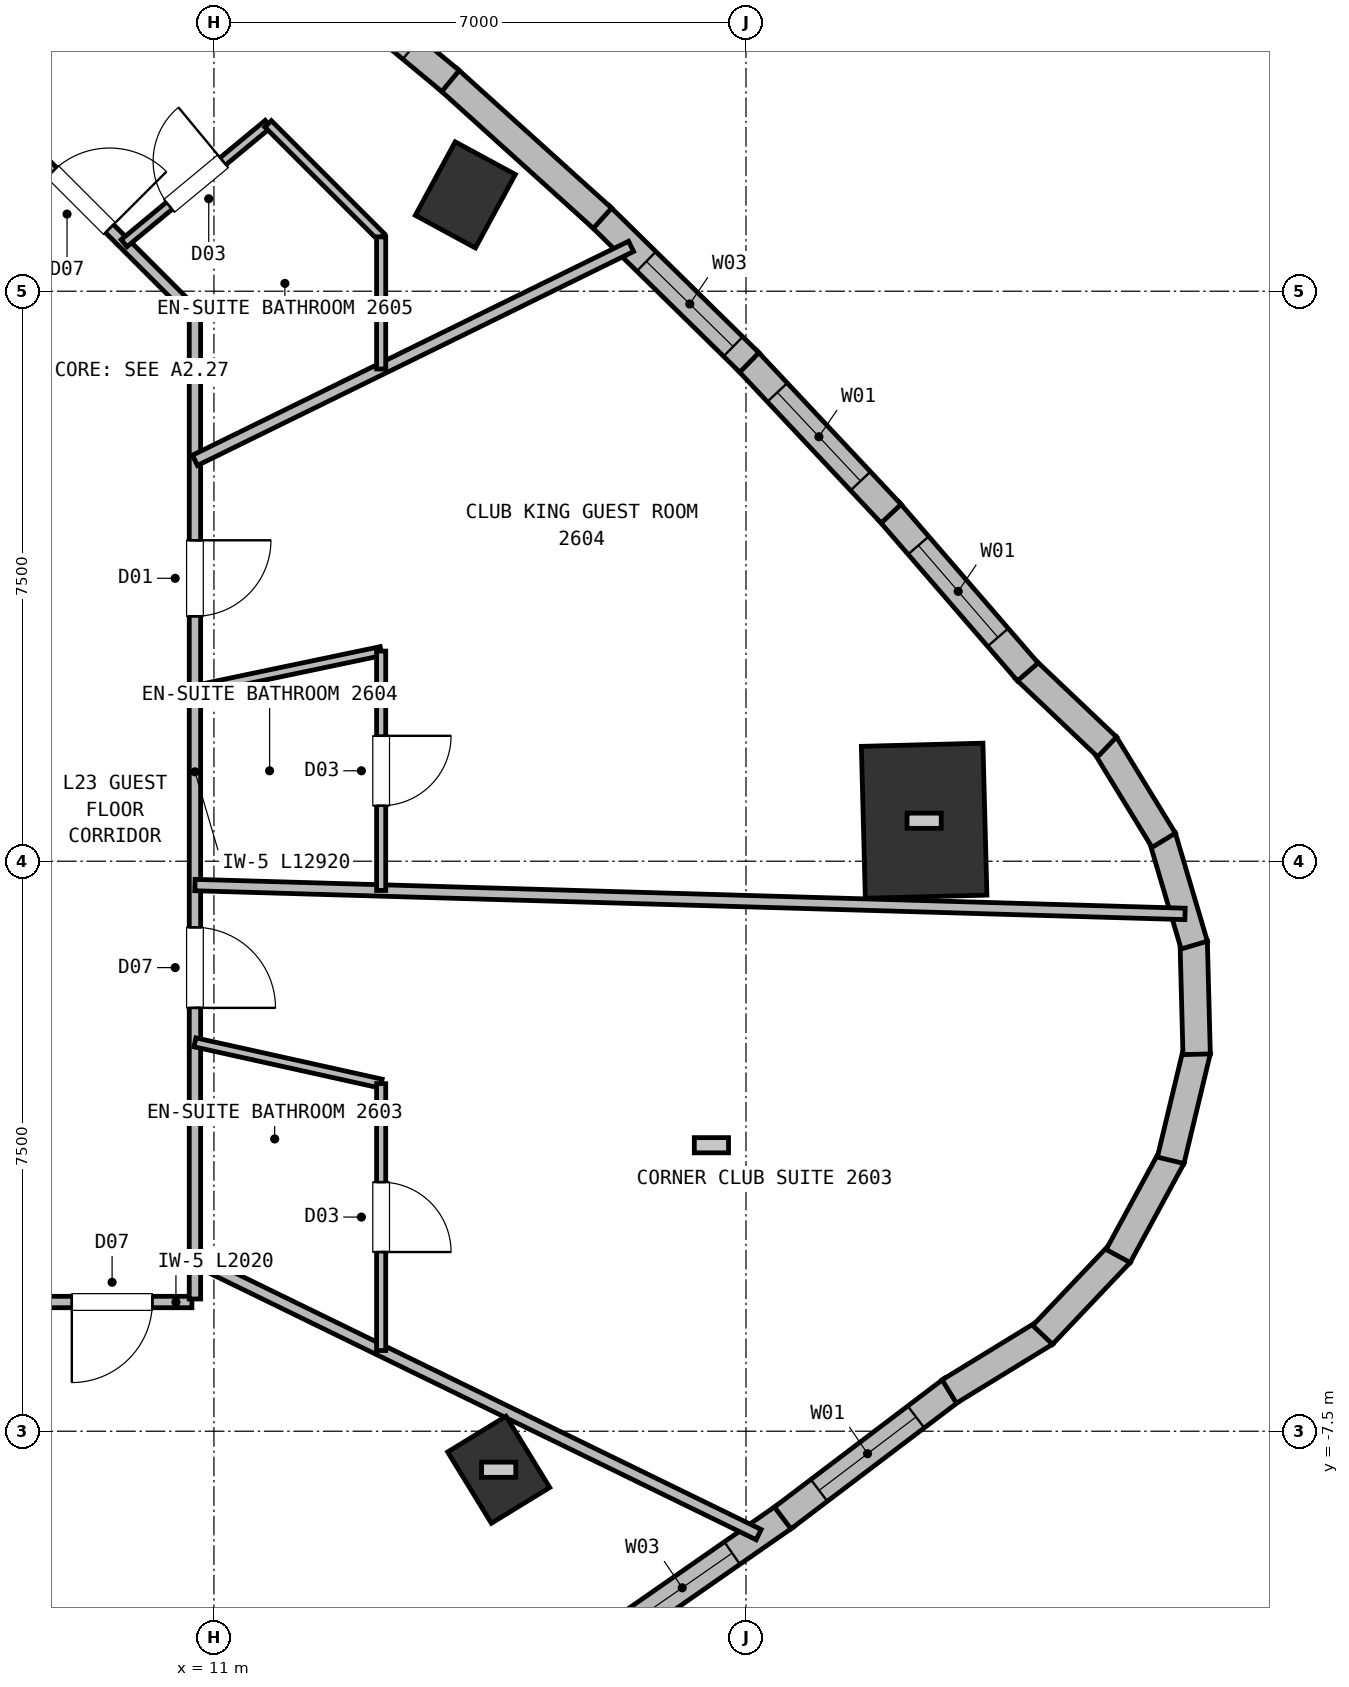
"""IFC4 building model, lengths in metres.
Left out: names, types, materials, properties, quantities, classifications, styles, units other than length and angle.
Written with IfcOpenShell. Run it as: python <this file> out.ifc"""

import sys

from ifc_helpers import new_model, si_unit, direction, frame, frame_2d, origin, origin_2d, place, context, subcontext, project, spatial, rectangle, extrude, element, fill, save


model = new_model("IFC4")
c1 = context("Model", 3, precision=1e-05, world=origin(), true_north=direction((0.0, 1.0)))
c2 = subcontext(c1, "Body", "Model", "MODEL_VIEW")
j1 = project(units=[si_unit("LENGTHUNIT", "METRE"), si_unit("PLANEANGLEUNIT", "RADIAN")], contexts=[c1])
p1 = place(None, origin())
s1 = spatial("IfcSite", under=j1, at=p1, CompositionType="ELEMENT")
p2 = place(p1, origin())
s2 = spatial("IfcBuilding", under=s1, at=p2, CompositionType="ELEMENT")
p3 = place(p2, frame((0.0, 0.0, 97.25)))
s3 = spatial("IfcBuildingStorey", under=s2, at=p3, CompositionType="ELEMENT", Elevation=97.25)
p4 = place(p3, frame((14.747, -8.007, 0.0), z_axis=(0.0, 0.0, 1.0), x_axis=(0.852640164354, 0.522498564716, 0.0)))
e1 = element("IfcColumn", 1, at=p4, inside=s3, PredefinedType="COLUMN", context=c2, shape_type="SweptSolid", body=[
    extrude(rectangle(XDim=0.9, YDim=1.1, at=origin_2d()), origin(), (0.0, 0.0, 1.0), 3.75),
])
p5 = place(p3, frame((20.344, 0.533, 0.0), z_axis=(0.0, 0.0, 1.0), x_axis=(0.999657324976, 0.026176948308, 0.0)))
e2 = element("IfcColumn", 2, at=p5, inside=s3, PredefinedType="COLUMN", context=c2, shape_type="SweptSolid", body=[
    extrude(rectangle(XDim=1.6, YDim=2.0, at=origin_2d()), origin(), (0.0, 0.0, 1.0), 3.75),
])
p6 = place(p3, frame((14.307, 8.767, 0.0), z_axis=(0.0, 0.0, 1.0), x_axis=(-0.878817112662, 0.47715876026, 0.0)))
e3 = element("IfcColumn", 3, at=p6, inside=s3, PredefinedType="COLUMN", context=c2, shape_type="SweptSolid", body=[
    extrude(rectangle(XDim=0.9, YDim=1.1, at=origin_2d()), origin(), (0.0, 0.0, 1.0), 3.75),
])
p7 = place(p3, frame((18.524, -8.612, 0.0), z_axis=(0.0, 0.0, 1.0), x_axis=(-0.820851453433, -0.5711417437, 0.0)))
e4 = element("IfcWall", 4, at=p7, inside=s3, PredefinedType="SOLIDWALL", context=c2, shape_type="SweptSolid", body=[
    extrude(rectangle(XDim=2.778, YDim=0.36, at=frame_2d((1.389, 0.0))), origin(), (0.0, 0.0, 1.0), 3.5),
])
p8 = place(p7, frame((0.86, 0.0, 0.72)))
e5 = element("IfcOpeningElement", 5, at=p8, cuts=e4, PredefinedType="OPENING", context=c2, shape_type="SweptSolid", body=[
    extrude(rectangle(XDim=1.6, YDim=1.88, at=frame_2d((0.8, 0.94))), frame((0.0, 0.19, 0.0), z_axis=(0.0, -1.0, 0.0), x_axis=(1.0, 0.0, 0.0)), (0.0, 0.0, 1.0), 0.38),
])
p9 = place(p3, frame((20.716, -6.949, 0.0), z_axis=(0.0, 0.0, 1.0), x_axis=(-0.796935762967, -0.604064060928, 0.0)))
e6 = element("IfcWall", 6, at=p9, inside=s3, PredefinedType="SOLIDWALL", context=c2, shape_type="SweptSolid", body=[
    extrude(rectangle(XDim=2.801, YDim=0.36, at=frame_2d((1.401, 0.0))), origin(), (0.0, 0.0, 1.0), 3.5),
])
p10 = place(p9, frame((0.601, 0.0, 0.72)))
e7 = element("IfcOpeningElement", 7, at=p10, cuts=e6, PredefinedType="OPENING", context=c2, shape_type="SweptSolid", body=[
    extrude(rectangle(XDim=1.6, YDim=1.88, at=frame_2d((0.8, 0.94))), frame((0.0, 0.19, 0.0), z_axis=(0.0, -1.0, 0.0), x_axis=(1.0, 0.0, 0.0)), (0.0, 0.0, 1.0), 0.38),
])
for number, where, z_axis, x_axis in (
    (8, (21.941, -6.201, 0.0), (0.0, 0.0, 1.0), (-0.853, -0.523, 0.0)),
    (9, (22.926, -5.155, 0.0), (0.0, 0.0, 1.0), (-0.688, -0.725, 0.0)),
):
    element("IfcWall", number, at=place(p3, frame(where, z_axis=z_axis, x_axis=x_axis)), inside=s3, PredefinedType="SOLIDWALL", context=c2, shape_type="SweptSolid", body=[
        extrude(rectangle(XDim=1.486, YDim=0.36, at=frame_2d((0.743, 0.0))), origin(), (0.0, 0.0, 1.0), 3.5),
    ])
for number, where, z_axis, x_axis in (
    (10, (23.605, -3.889, 0.0), (0.0, 0.0, 1.0), (-0.477, -0.879, 0.0)),
    (11, (23.934, -2.491, 0.0), (0.0, 0.0, 1.0), (-0.233, -0.972, 0.0)),
):
    element("IfcWall", number, at=place(p3, frame(where, z_axis=z_axis, x_axis=x_axis)), inside=s3, PredefinedType="SOLIDWALL", context=c2, shape_type="SweptSolid", body=[
        extrude(rectangle(XDim=1.486, YDim=0.36, at=frame_2d((0.743, 0.0))), origin(), (0.0, 0.0, 1.0), 3.5),
    ])
for number, where, z_axis, x_axis in (
    (12, (23.89, -1.055, 0.0), (0.0, 0.0, 1.0), (0.026, -1.0, 0.0)),
    (13, (23.476, 0.321, 0.0), (0.0, 0.0, 1.0), (0.284, -0.959, 0.0)),
    (14, (22.72, 1.542, 0.0), (0.0, 0.0, 1.0), (0.523, -0.853, 0.0)),
    (15, (21.673, 2.527, 0.0), (0.0, 0.0, 1.0), (0.725, -0.688, 0.0)),
):
    element("IfcWall", number, at=place(p3, frame(where, z_axis=z_axis, x_axis=x_axis)), inside=s3, PredefinedType="SOLIDWALL", context=c2, shape_type="SweptSolid", body=[
        extrude(rectangle(XDim=1.486, YDim=0.36, at=frame_2d((0.743, 0.0))), origin(), (0.0, 0.0, 1.0), 3.5),
    ])
p11 = place(p3, frame((19.876, 4.61, 0.0), z_axis=(0.0, 0.0, 1.0), x_axis=(0.653907994708, -0.75657407731, 0.0)))
e16 = element("IfcWall", 16, at=p11, inside=s3, PredefinedType="SOLIDWALL", context=c2, shape_type="SweptSolid", body=[
    extrude(rectangle(XDim=2.801, YDim=0.36, at=frame_2d((1.401, 0.0))), origin(), (0.0, 0.0, 1.0), 3.5),
])
p12 = place(p11, frame((0.601, 0.0, 0.72)))
e17 = element("IfcOpeningElement", 17, at=p12, cuts=e16, PredefinedType="OPENING", context=c2, shape_type="SweptSolid", body=[
    extrude(rectangle(XDim=1.6, YDim=1.88, at=frame_2d((0.8, 0.94))), frame((0.0, 0.19, 0.0), z_axis=(0.0, -1.0, 0.0), x_axis=(1.0, 0.0, 0.0)), (0.0, 0.0, 1.0), 0.38),
])
p13 = place(p3, frame((18.009, 6.598, 0.0), z_axis=(0.0, 0.0, 1.0), x_axis=(0.68415455393, -0.729337059484, 0.0)))
e18 = element("IfcWall", 18, at=p13, inside=s3, PredefinedType="SOLIDWALL", context=c2, shape_type="SweptSolid", body=[
    extrude(rectangle(XDim=2.777, YDim=0.36, at=frame_2d((1.389, 0.0))), origin(), (0.0, 0.0, 1.0), 3.5),
])
p14 = place(p13, frame((0.589, 0.0, 0.72)))
e19 = element("IfcOpeningElement", 19, at=p14, cuts=e18, PredefinedType="OPENING", context=c2, shape_type="SweptSolid", body=[
    extrude(rectangle(XDim=1.6, YDim=1.88, at=frame_2d((0.8, 0.94))), frame((0.0, 0.19, 0.0), z_axis=(0.0, -1.0, 0.0), x_axis=(1.0, 0.0, 0.0)), (0.0, 0.0, 1.0), 0.38),
])
p15 = place(p3, frame((16.075, 8.495, 0.0), z_axis=(0.0, 0.0, 1.0), x_axis=(0.713713584755, -0.70043766242, 0.0)))
e20 = element("IfcWall", 20, at=p15, inside=s3, PredefinedType="SOLIDWALL", context=c2, shape_type="SweptSolid", body=[
    extrude(rectangle(XDim=2.759, YDim=0.36, at=frame_2d((1.379, 0.0))), origin(), (0.0, 0.0, 1.0), 3.5),
])
p16 = place(p15, frame((0.86, 0.0, 0.72)))
e21 = element("IfcOpeningElement", 21, at=p16, cuts=e20, PredefinedType="OPENING", context=c2, shape_type="SweptSolid", body=[
    extrude(rectangle(XDim=1.6, YDim=1.88, at=frame_2d((0.8, 0.94))), frame((0.0, 0.19, 0.0), z_axis=(0.0, -1.0, 0.0), x_axis=(1.0, 0.0, 0.0)), (0.0, 0.0, 1.0), 0.38),
])
p17 = place(p3, frame((14.075, 10.299, 0.0), z_axis=(0.0, 0.0, 1.0), x_axis=(0.742346706701, -0.67001594537, 0.0)))
e22 = element("IfcWall", 22, at=p17, inside=s3, PredefinedType="SOLIDWALL", context=c2, shape_type="SweptSolid", body=[
    extrude(rectangle(XDim=2.744, YDim=0.36, at=frame_2d((1.372, 0.0))), origin(), (0.0, 0.0, 1.0), 3.5),
])
p18 = place(p3, frame((12.007, 12.011, 0.0), z_axis=(0.0, 0.0, 1.0), x_axis=(0.769960149578, -0.63809197461, 0.0)))
e23 = element("IfcWall", 23, at=p18, inside=s3, PredefinedType="SOLIDWALL", context=c2, shape_type="SweptSolid", body=[
    extrude(rectangle(XDim=2.735, YDim=0.36, at=frame_2d((1.367, 0.0))), origin(), (0.0, 0.0, 1.0), 3.5),
])
p19 = place(p18, frame((0.667, 0.0, 0.72)))
e24 = element("IfcOpeningElement", 24, at=p19, cuts=e23, PredefinedType="OPENING", context=c2, shape_type="SweptSolid", body=[
    extrude(rectangle(XDim=1.4, YDim=1.84, at=frame_2d((0.7, 0.92))), frame((0.0, 0.19, 0.0), z_axis=(0.0, -1.0, 0.0), x_axis=(1.0, 0.0, 0.0)), (0.0, 0.0, 1.0), 0.38),
])
p20 = place(p3, frame((10.71, -5.8, 0.0), z_axis=(0.0, 0.0, 1.0), x_axis=(-1.0, 0.0, 0.0)))
e25 = element("IfcWall", 25, at=p20, inside=s3, PredefinedType="PARTITIONING", context=c2, shape_type="SweptSolid", body=[
    extrude(rectangle(XDim=2.02, YDim=0.15, at=frame_2d((1.01, 0.0))), origin(), (0.0, 0.0, 1.0), 3.5),
])
p21 = place(p20, frame((0.52, 0.0, 0.0)))
e26 = element("IfcOpeningElement", 26, at=p21, cuts=e25, PredefinedType="OPENING", context=c2, shape_type="SweptSolid", body=[
    extrude(rectangle(XDim=1.06, YDim=2.15, at=frame_2d((0.53, 1.075))), frame((0.0, 0.085, 0.0), z_axis=(0.0, -1.0, 0.0), x_axis=(1.0, 0.0, 0.0)), (0.0, 0.0, 1.0), 0.17),
])
p22 = place(p3, frame((10.75, 7.16, 0.0), z_axis=(0.0, 0.0, 1.0), x_axis=(0.0, -1.0, 0.0)))
e27 = element("IfcWall", 27, at=p22, inside=s3, PredefinedType="PARTITIONING", context=c2, shape_type="SweptSolid", body=[
    extrude(rectangle(XDim=12.92, YDim=0.15, at=frame_2d((6.46, 0.0))), origin(), (0.0, 0.0, 1.0), 3.5),
])
p23 = place(p22, frame((2.937, 0.0, 0.0)))
e28 = element("IfcOpeningElement", 28, at=p23, cuts=e27, PredefinedType="OPENING", context=c2, shape_type="SweptSolid", body=[
    extrude(rectangle(XDim=1.0, YDim=2.15, at=frame_2d((0.5, 1.075))), frame((0.0, 0.085, 0.0), z_axis=(0.0, -1.0, 0.0), x_axis=(1.0, 0.0, 0.0)), (0.0, 0.0, 1.0), 0.17),
])
p24 = place(p22, frame((8.03, 0.0, 0.0)))
e29 = element("IfcOpeningElement", 29, at=p24, cuts=e27, PredefinedType="OPENING", context=c2, shape_type="SweptSolid", body=[
    extrude(rectangle(XDim=1.06, YDim=2.15, at=frame_2d((0.53, 1.075))), frame((0.0, 0.085, 0.0), z_axis=(0.0, -1.0, 0.0), x_axis=(1.0, 0.0, 0.0)), (0.0, 0.0, 1.0), 0.17),
])
p25 = place(p3, frame((8.678, 9.272, 0.0), z_axis=(0.0, 0.0, 1.0), x_axis=(0.707106781187, -0.707106781187, 0.0)))
e30 = element("IfcWall", 30, at=p25, inside=s3, PredefinedType="PARTITIONING", context=c2, shape_type="SweptSolid", body=[
    extrude(rectangle(XDim=2.89, YDim=0.15, at=frame_2d((1.445, 0.0))), origin(), (0.0, 0.0, 1.0), 3.5),
])
p26 = place(p25, frame((0.28, 0.0, 0.0)))
e31 = element("IfcOpeningElement", 31, at=p26, cuts=e30, PredefinedType="OPENING", context=c2, shape_type="SweptSolid", body=[
    extrude(rectangle(XDim=1.06, YDim=2.15, at=frame_2d((0.53, 1.075))), frame((0.0, 0.085, 0.0), z_axis=(0.0, -1.0, 0.0), x_axis=(1.0, 0.0, 0.0)), (0.0, 0.0, 1.0), 0.17),
])
p27 = place(p3, frame((10.75, -5.243, 0.0), z_axis=(0.0, 0.0, 1.0), x_axis=(0.898792044872, -0.4383752503, 0.0)))
e32 = element("IfcWall", 32, at=p27, inside=s3, PredefinedType="PARTITIONING", context=c2, shape_type="SweptSolid", body=[
    extrude(rectangle(XDim=8.252, YDim=0.15, at=frame_2d((4.126, 0.0))), origin(), (0.0, 0.0, 1.0), 3.5),
])
p28 = place(p3, frame((10.75, -2.383, 0.0), z_axis=(0.0, 0.0, 1.0), x_axis=(0.976289961462, -0.216466882337, 0.0)))
e33 = element("IfcWall", 33, at=p28, inside=s3, PredefinedType="PARTITIONING", context=c2, shape_type="SweptSolid", body=[
    extrude(rectangle(XDim=2.51, YDim=0.12, at=frame_2d((1.255, 0.0))), origin(), (0.0, 0.0, 1.0), 3.5),
])
p29 = place(p3, frame((13.2, -2.927, 0.0), z_axis=(0.0, 0.0, 1.0), x_axis=(0.0, -1.0, 0.0)))
e34 = element("IfcWall", 34, at=p29, inside=s3, PredefinedType="PARTITIONING", context=c2, shape_type="SweptSolid", body=[
    extrude(rectangle(XDim=3.511, YDim=0.12, at=frame_2d((1.756, 0.0))), origin(), (0.0, 0.0, 1.0), 3.5),
])
p30 = place(p29, frame((1.296, 0.0, 0.0)))
e35 = element("IfcOpeningElement", 35, at=p30, cuts=e34, PredefinedType="OPENING", context=c2, shape_type="SweptSolid", body=[
    extrude(rectangle(XDim=0.92, YDim=2.1, at=frame_2d((0.46, 1.05))), frame((0.0, 0.07, 0.0), z_axis=(0.0, -1.0, 0.0), x_axis=(1.0, 0.0, 0.0)), (0.0, 0.0, 1.0), 0.14),
])
p31 = place(p3, frame((10.75, -0.313, 0.0), z_axis=(0.0, 0.0, 1.0), x_axis=(0.999575058165, -0.029149667157, 0.0)))
e36 = element("IfcWall", 36, at=p31, inside=s3, PredefinedType="PARTITIONING", context=c2, shape_type="SweptSolid", body=[
    extrude(rectangle(XDim=13.032, YDim=0.15, at=frame_2d((6.516, 0.0))), origin(), (0.0, 0.0, 1.0), 3.5),
])
p32 = place(p3, frame((13.2, 2.765, 0.0), z_axis=(0.0, 0.0, 1.0), x_axis=(-0.978777888037, -0.204924000276, 0.0)))
e37 = element("IfcWall", 37, at=p32, inside=s3, PredefinedType="PARTITIONING", context=c2, shape_type="SweptSolid", body=[
    extrude(rectangle(XDim=2.503, YDim=0.12, at=frame_2d((1.251, 0.0))), origin(), (0.0, 0.0, 1.0), 3.5),
])
p33 = place(p3, frame((13.2, 2.765, 0.0), z_axis=(0.0, 0.0, 1.0), x_axis=(0.0, -1.0, 0.0)))
e38 = element("IfcWall", 38, at=p33, inside=s3, PredefinedType="PARTITIONING", context=c2, shape_type="SweptSolid", body=[
    extrude(rectangle(XDim=3.15, YDim=0.12, at=frame_2d((1.575, 0.0))), origin(), (0.0, 0.0, 1.0), 3.5),
])
p34 = place(p33, frame((1.115, 0.0, 0.0)))
e39 = element("IfcOpeningElement", 39, at=p34, cuts=e38, PredefinedType="OPENING", context=c2, shape_type="SweptSolid", body=[
    extrude(rectangle(XDim=0.92, YDim=2.1, at=frame_2d((0.46, 1.05))), frame((0.0, 0.07, 0.0), z_axis=(0.0, -1.0, 0.0), x_axis=(1.0, 0.0, 0.0)), (0.0, 0.0, 1.0), 0.14),
])
p35 = place(p3, frame((10.75, 5.274, 0.0), z_axis=(0.0, 0.0, 1.0), x_axis=(0.897755780575, 0.440493539616, 0.0)))
e40 = element("IfcWall", 40, at=p35, inside=s3, PredefinedType="PARTITIONING", context=c2, shape_type="SweptSolid", body=[
    extrude(rectangle(XDim=6.392, YDim=0.15, at=frame_2d((3.196, 0.0))), origin(), (0.0, 0.0, 1.0), 3.5),
])
p36 = place(p3, frame((9.818, 8.132, 0.0), z_axis=(0.0, 0.0, 1.0), x_axis=(0.770088402747, 0.63793718496, 0.0)))
e41 = element("IfcWall", 41, at=p36, inside=s3, PredefinedType="PARTITIONING", context=c2, shape_type="SweptSolid", body=[
    extrude(rectangle(XDim=2.461, YDim=0.12, at=frame_2d((1.23, 0.0))), origin(), (0.0, 0.0, 1.0), 3.5),
])
p37 = place(p36, frame((0.771, 0.0, 0.0)))
e42 = element("IfcOpeningElement", 42, at=p37, cuts=e41, PredefinedType="OPENING", context=c2, shape_type="SweptSolid", body=[
    extrude(rectangle(XDim=0.92, YDim=2.1, at=frame_2d((0.46, 1.05))), frame((0.0, 0.07, 0.0), z_axis=(0.0, -1.0, 0.0), x_axis=(1.0, 0.0, 0.0)), (0.0, 0.0, 1.0), 0.14),
])
p38 = place(p3, frame((11.713, 9.702, 0.0), z_axis=(0.0, 0.0, 1.0), x_axis=(0.707106781187, -0.707106781187, 0.0)))
e43 = element("IfcWall", 43, at=p38, inside=s3, PredefinedType="PARTITIONING", context=c2, shape_type="SweptSolid", body=[
    extrude(rectangle(XDim=2.103, YDim=0.12, at=frame_2d((1.052, 0.0))), origin(), (0.0, 0.0, 1.0), 3.5),
])
p39 = place(p3, frame((13.2, 6.477, 0.0), z_axis=(0.0, 0.0, 1.0), x_axis=(0.0, 1.0, 0.0)))
e44 = element("IfcWall", 44, at=p39, inside=s3, PredefinedType="PARTITIONING", context=c2, shape_type="SweptSolid", body=[
    extrude(rectangle(XDim=1.738, YDim=0.12, at=frame_2d((0.869, 0.0))), origin(), (0.0, 0.0, 1.0), 3.5),
])
p40 = place(p3, frame((7.04, 9.3, 0.0), z_axis=(0.0, 0.0, 1.0), x_axis=(0.603580834167, 0.797301810249, 0.0)))
e45 = element("IfcWall", 45, at=p40, inside=s3, PredefinedType="PARTITIONING", context=c2, shape_type="SweptSolid", body=[
    extrude(rectangle(XDim=5.162, YDim=0.15, at=frame_2d((2.581, 0.0))), origin(), (0.0, 0.0, 1.0), 3.5),
])
p41 = place(p8, origin())
e46 = element("IfcWindow", 46, at=p41, inside=s3, PartitioningType="SINGLE_PANEL", PredefinedType="WINDOW", context=c2, shape_type="SweptSolid", body=[
    extrude(rectangle(XDim=1.6, YDim=1.88, at=frame_2d((0.8, 0.94))), frame((0.0, 0.03, 0.0), z_axis=(0.0, -1.0, 0.0), x_axis=(1.0, 0.0, 0.0)), (0.0, 0.0, 1.0), 0.06),
])
fill(e5, e46)
p42 = place(p10, origin())
e47 = element("IfcWindow", 47, at=p42, inside=s3, PartitioningType="SINGLE_PANEL", PredefinedType="WINDOW", context=c2, shape_type="SweptSolid", body=[
    extrude(rectangle(XDim=1.6, YDim=1.88, at=frame_2d((0.8, 0.94))), frame((0.0, 0.03, 0.0), z_axis=(0.0, -1.0, 0.0), x_axis=(1.0, 0.0, 0.0)), (0.0, 0.0, 1.0), 0.06),
])
fill(e7, e47)
p43 = place(p12, origin())
e48 = element("IfcWindow", 48, at=p43, inside=s3, PartitioningType="SINGLE_PANEL", PredefinedType="WINDOW", context=c2, shape_type="SweptSolid", body=[
    extrude(rectangle(XDim=1.6, YDim=1.88, at=frame_2d((0.8, 0.94))), frame((0.0, 0.03, 0.0), z_axis=(0.0, -1.0, 0.0), x_axis=(1.0, 0.0, 0.0)), (0.0, 0.0, 1.0), 0.06),
])
fill(e17, e48)
p44 = place(p14, origin())
e49 = element("IfcWindow", 49, at=p44, inside=s3, PartitioningType="SINGLE_PANEL", PredefinedType="WINDOW", context=c2, shape_type="SweptSolid", body=[
    extrude(rectangle(XDim=1.6, YDim=1.88, at=frame_2d((0.8, 0.94))), frame((0.0, 0.03, 0.0), z_axis=(0.0, -1.0, 0.0), x_axis=(1.0, 0.0, 0.0)), (0.0, 0.0, 1.0), 0.06),
])
fill(e19, e49)
p45 = place(p16, origin())
e50 = element("IfcWindow", 50, at=p45, inside=s3, PartitioningType="SINGLE_PANEL", PredefinedType="WINDOW", context=c2, shape_type="SweptSolid", body=[
    extrude(rectangle(XDim=1.6, YDim=1.88, at=frame_2d((0.8, 0.94))), frame((0.0, 0.03, 0.0), z_axis=(0.0, -1.0, 0.0), x_axis=(1.0, 0.0, 0.0)), (0.0, 0.0, 1.0), 0.06),
])
fill(e21, e50)
p46 = place(p30, origin())
e51 = element("IfcDoor", 51, at=p46, inside=s3, OperationType="SINGLE_SWING_RIGHT", PredefinedType="DOOR", context=c2, shape_type="SweptSolid", body=[
    extrude(rectangle(XDim=0.92, YDim=2.1, at=frame_2d((0.46, 1.05))), frame((0.0, 0.025, 0.0), z_axis=(0.0, -1.0, 0.0), x_axis=(1.0, 0.0, 0.0)), (0.0, 0.0, 1.0), 0.05),
])
fill(e35, e51)
p47 = place(p34, origin())
e52 = element("IfcDoor", 52, at=p47, inside=s3, OperationType="SINGLE_SWING_LEFT", PredefinedType="DOOR", context=c2, shape_type="SweptSolid", body=[
    extrude(rectangle(XDim=0.92, YDim=2.1, at=frame_2d((0.46, 1.05))), frame((0.0, 0.025, 0.0), z_axis=(0.0, -1.0, 0.0), x_axis=(1.0, 0.0, 0.0)), (0.0, 0.0, 1.0), 0.05),
])
fill(e39, e52)
p48 = place(p37, origin())
e53 = element("IfcDoor", 53, at=p48, inside=s3, OperationType="SINGLE_SWING_RIGHT", PredefinedType="DOOR", context=c2, shape_type="SweptSolid", body=[
    extrude(rectangle(XDim=0.92, YDim=2.1, at=frame_2d((0.46, 1.05))), frame((0.0, 0.025, 0.0), z_axis=(0.0, -1.0, 0.0), x_axis=(1.0, 0.0, 0.0)), (0.0, 0.0, 1.0), 0.05),
])
fill(e42, e53)
p49 = place(p26, origin())
e54 = element("IfcDoor", 54, at=p49, inside=s3, OperationType="SINGLE_SWING_RIGHT", PredefinedType="DOOR", context=c2, shape_type="SweptSolid", body=[
    extrude(rectangle(XDim=1.06, YDim=2.15, at=frame_2d((0.53, 1.075))), frame((0.0, 0.025, 0.0), z_axis=(0.0, -1.0, 0.0), x_axis=(1.0, 0.0, 0.0)), (0.0, 0.0, 1.0), 0.05),
])
fill(e31, e54)
p50 = place(p23, origin())
e55 = element("IfcDoor", 55, at=p50, inside=s3, OperationType="SINGLE_SWING_LEFT", PredefinedType="DOOR", context=c2, shape_type="SweptSolid", body=[
    extrude(rectangle(XDim=1.0, YDim=2.15, at=frame_2d((0.5, 1.075))), frame((0.0, 0.025, 0.0), z_axis=(0.0, -1.0, 0.0), x_axis=(1.0, 0.0, 0.0)), (0.0, 0.0, 1.0), 0.05),
])
fill(e28, e55)
p51 = place(p24, origin())
e56 = element("IfcDoor", 56, at=p51, inside=s3, OperationType="SINGLE_SWING_RIGHT", PredefinedType="DOOR", context=c2, shape_type="SweptSolid", body=[
    extrude(rectangle(XDim=1.06, YDim=2.15, at=frame_2d((0.53, 1.075))), frame((0.0, 0.025, 0.0), z_axis=(0.0, -1.0, 0.0), x_axis=(1.0, 0.0, 0.0)), (0.0, 0.0, 1.0), 0.05),
])
fill(e29, e56)
p52 = place(p21, origin())
e57 = element("IfcDoor", 57, at=p52, inside=s3, OperationType="SINGLE_SWING_RIGHT", PredefinedType="DOOR", context=c2, shape_type="SweptSolid", body=[
    extrude(rectangle(XDim=1.06, YDim=2.15, at=frame_2d((0.53, 1.075))), frame((0.0, 0.025, 0.0), z_axis=(0.0, -1.0, 0.0), x_axis=(1.0, 0.0, 0.0)), (0.0, 0.0, 1.0), 0.05),
])
fill(e26, e57)
save(model, sys.argv[1])
